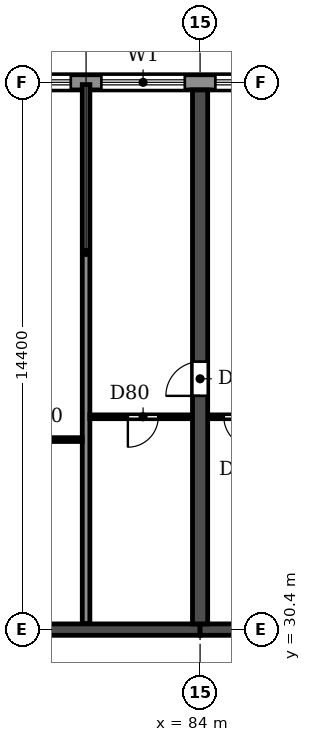
"""IFC4 building model, lengths in metres.
Left out: names, types, materials, properties, quantities, classifications, styles, units other than length and angle.
Written with IfcOpenShell. Run it as: python <this file> out.ifc"""

import sys

from ifc_helpers import new_model, si_unit, direction, frame, frame_2d, origin, place, context, subcontext, project, spatial, rectangle, extrude, element, fill, save


model = new_model("IFC4")
c1 = context("Model", 3, precision=1e-05, world=origin(), true_north=direction((0.0, 1.0)))
c2 = subcontext(c1, "Body", "Model", "MODEL_VIEW")
j1 = project(units=[si_unit("LENGTHUNIT", "METRE"), si_unit("PLANEANGLEUNIT", "RADIAN")], contexts=[c1])
p1 = place(None, origin())
s1 = spatial("IfcSite", under=j1, at=p1, CompositionType="ELEMENT")
p2 = place(p1, origin())
s2 = spatial("IfcBuilding", under=s1, at=p2, CompositionType="ELEMENT")
p3 = place(p2, frame((0.0, 0.0, 23.4)))
s3 = spatial("IfcBuildingStorey", under=s2, at=p3, CompositionType="ELEMENT", Elevation=23.4)
p4 = place(p3, frame((84.0, 30.55, 0.0), z_axis=(0.0, 0.0, 1.0), x_axis=(0.0, 1.0, 0.0)))
e1 = element("IfcWall", 1, at=p4, inside=s3, PredefinedType="SHEAR", context=c2, shape_type="SweptSolid", body=[
    extrude(rectangle(XDim=14.05, YDim=0.4, at=frame_2d((7.025, 0.0))), origin(), (0.0, 0.0, 1.0), 3.05),
])
p5 = place(p4, frame((6.0, 0.0, 0.0)))
e2 = element("IfcOpeningElement", 2, at=p5, cuts=e1, PredefinedType="OPENING", context=c2, shape_type="SweptSolid", body=[
    extrude(rectangle(XDim=0.9, YDim=2.1, at=frame_2d((0.45, 1.05))), frame((0.0, 0.21, 0.0), z_axis=(0.0, -1.0, 0.0), x_axis=(1.0, 0.0, 0.0)), (0.0, 0.0, 1.0), 0.42),
])
p6 = place(p3, frame((78.0, 30.4, 0.0), z_axis=(0.0, 0.0, 1.0), x_axis=(1.0, 0.0, 0.0)))
e3 = element("IfcWall", 3, at=p6, inside=s3, PredefinedType="SHEAR", context=c2, shape_type="SweptSolid", body=[
    extrude(rectangle(XDim=6.0, YDim=0.3, at=frame_2d((3.0, 0.0))), origin(), (0.0, 0.0, 1.0), 2.45),
])
p7 = place(p3, frame((84.0, 30.4, 0.0), z_axis=(0.0, 0.0, 1.0), x_axis=(1.0, 0.0, 0.0)))
e4 = element("IfcWall", 4, at=p7, inside=s3, PredefinedType="SHEAR", context=c2, shape_type="SweptSolid", body=[
    extrude(rectangle(XDim=6.0, YDim=0.3, at=frame_2d((3.0, 0.0))), origin(), (0.0, 0.0, 1.0), 2.45),
])
p8 = place(p7, frame((2.45, 0.0, 0.0)))
e5 = element("IfcOpeningElement", 5, at=p8, cuts=e4, PredefinedType="OPENING", context=c2, shape_type="SweptSolid", body=[
    extrude(rectangle(XDim=1.0, YDim=2.1, at=frame_2d((0.5, 1.05))), frame((0.0, 0.16, 0.0), z_axis=(0.0, -1.0, 0.0), x_axis=(1.0, 0.0, 0.0)), (0.0, 0.0, 1.0), 0.32),
])
p9 = place(p3, frame((97.317, 44.8, 0.0), z_axis=(0.0, 0.0, 1.0), x_axis=(-1.0, 0.0, 0.0)))
e6 = element("IfcWall", 6, at=p9, inside=s3, PredefinedType="STANDARD", context=c2, shape_type="SweptSolid", body=[
    extrude(rectangle(XDim=92.634, YDim=0.4, at=frame_2d((46.317, 0.0))), origin(), (0.0, 0.0, 1.0), 3.05),
])
p10 = place(p9, frame((88.717, 0.0, 0.9)))
e7 = element("IfcOpeningElement", 7, at=p10, cuts=e6, PredefinedType="OPENING", context=c2, shape_type="SweptSolid", body=[
    extrude(rectangle(XDim=2.2, YDim=1.5, at=frame_2d((1.1, 0.75))), frame((0.0, 0.21, 0.0), z_axis=(0.0, -1.0, 0.0), x_axis=(1.0, 0.0, 0.0)), (0.0, 0.0, 1.0), 0.42),
])
p11 = place(p9, frame((85.917, 0.0, 0.0)))
e8 = element("IfcOpeningElement", 8, at=p11, cuts=e6, PredefinedType="OPENING", context=c2, shape_type="SweptSolid", body=[
    extrude(rectangle(XDim=1.8, YDim=2.4, at=frame_2d((0.9, 1.2))), frame((0.0, 0.21, 0.0), z_axis=(0.0, -1.0, 0.0), x_axis=(1.0, 0.0, 0.0)), (0.0, 0.0, 1.0), 0.42),
])
p12 = place(p9, frame((82.717, 0.0, 0.9)))
e9 = element("IfcOpeningElement", 9, at=p12, cuts=e6, PredefinedType="OPENING", context=c2, shape_type="SweptSolid", body=[
    extrude(rectangle(XDim=2.2, YDim=1.5, at=frame_2d((1.1, 0.75))), frame((0.0, 0.21, 0.0), z_axis=(0.0, -1.0, 0.0), x_axis=(1.0, 0.0, 0.0)), (0.0, 0.0, 1.0), 0.42),
])
p13 = place(p9, frame((79.717, 0.0, 0.9)))
e10 = element("IfcOpeningElement", 10, at=p13, cuts=e6, PredefinedType="OPENING", context=c2, shape_type="SweptSolid", body=[
    extrude(rectangle(XDim=2.2, YDim=1.5, at=frame_2d((1.1, 0.75))), frame((0.0, 0.21, 0.0), z_axis=(0.0, -1.0, 0.0), x_axis=(1.0, 0.0, 0.0)), (0.0, 0.0, 1.0), 0.42),
])
p14 = place(p9, frame((76.917, 0.0, 0.0)))
e11 = element("IfcOpeningElement", 11, at=p14, cuts=e6, PredefinedType="OPENING", context=c2, shape_type="SweptSolid", body=[
    extrude(rectangle(XDim=1.8, YDim=2.4, at=frame_2d((0.9, 1.2))), frame((0.0, 0.21, 0.0), z_axis=(0.0, -1.0, 0.0), x_axis=(1.0, 0.0, 0.0)), (0.0, 0.0, 1.0), 0.42),
])
p15 = place(p9, frame((73.717, 0.0, 0.9)))
e12 = element("IfcOpeningElement", 12, at=p15, cuts=e6, PredefinedType="OPENING", context=c2, shape_type="SweptSolid", body=[
    extrude(rectangle(XDim=2.2, YDim=1.5, at=frame_2d((1.1, 0.75))), frame((0.0, 0.21, 0.0), z_axis=(0.0, -1.0, 0.0), x_axis=(1.0, 0.0, 0.0)), (0.0, 0.0, 1.0), 0.42),
])
p16 = place(p9, frame((70.717, 0.0, 0.9)))
e13 = element("IfcOpeningElement", 13, at=p16, cuts=e6, PredefinedType="OPENING", context=c2, shape_type="SweptSolid", body=[
    extrude(rectangle(XDim=2.2, YDim=1.5, at=frame_2d((1.1, 0.75))), frame((0.0, 0.21, 0.0), z_axis=(0.0, -1.0, 0.0), x_axis=(1.0, 0.0, 0.0)), (0.0, 0.0, 1.0), 0.42),
])
p17 = place(p9, frame((67.717, 0.0, 0.9)))
e14 = element("IfcOpeningElement", 14, at=p17, cuts=e6, PredefinedType="OPENING", context=c2, shape_type="SweptSolid", body=[
    extrude(rectangle(XDim=2.2, YDim=1.5, at=frame_2d((1.1, 0.75))), frame((0.0, 0.21, 0.0), z_axis=(0.0, -1.0, 0.0), x_axis=(1.0, 0.0, 0.0)), (0.0, 0.0, 1.0), 0.42),
])
p18 = place(p9, frame((64.917, 0.0, 0.0)))
e15 = element("IfcOpeningElement", 15, at=p18, cuts=e6, PredefinedType="OPENING", context=c2, shape_type="SweptSolid", body=[
    extrude(rectangle(XDim=1.8, YDim=2.4, at=frame_2d((0.9, 1.2))), frame((0.0, 0.21, 0.0), z_axis=(0.0, -1.0, 0.0), x_axis=(1.0, 0.0, 0.0)), (0.0, 0.0, 1.0), 0.42),
])
p19 = place(p9, frame((61.717, 0.0, 0.9)))
e16 = element("IfcOpeningElement", 16, at=p19, cuts=e6, PredefinedType="OPENING", context=c2, shape_type="SweptSolid", body=[
    extrude(rectangle(XDim=2.2, YDim=1.5, at=frame_2d((1.1, 0.75))), frame((0.0, 0.21, 0.0), z_axis=(0.0, -1.0, 0.0), x_axis=(1.0, 0.0, 0.0)), (0.0, 0.0, 1.0), 0.42),
])
p20 = place(p9, frame((58.717, 0.0, 0.9)))
e17 = element("IfcOpeningElement", 17, at=p20, cuts=e6, PredefinedType="OPENING", context=c2, shape_type="SweptSolid", body=[
    extrude(rectangle(XDim=2.2, YDim=1.5, at=frame_2d((1.1, 0.75))), frame((0.0, 0.21, 0.0), z_axis=(0.0, -1.0, 0.0), x_axis=(1.0, 0.0, 0.0)), (0.0, 0.0, 1.0), 0.42),
])
p21 = place(p9, frame((55.917, 0.0, 0.0)))
e18 = element("IfcOpeningElement", 18, at=p21, cuts=e6, PredefinedType="OPENING", context=c2, shape_type="SweptSolid", body=[
    extrude(rectangle(XDim=1.8, YDim=2.4, at=frame_2d((0.9, 1.2))), frame((0.0, 0.21, 0.0), z_axis=(0.0, -1.0, 0.0), x_axis=(1.0, 0.0, 0.0)), (0.0, 0.0, 1.0), 0.42),
])
p22 = place(p9, frame((52.917, 0.0, 0.0)))
e19 = element("IfcOpeningElement", 19, at=p22, cuts=e6, PredefinedType="OPENING", context=c2, shape_type="SweptSolid", body=[
    extrude(rectangle(XDim=1.8, YDim=2.4, at=frame_2d((0.9, 1.2))), frame((0.0, 0.21, 0.0), z_axis=(0.0, -1.0, 0.0), x_axis=(1.0, 0.0, 0.0)), (0.0, 0.0, 1.0), 0.42),
])
p23 = place(p9, frame((49.717, 0.0, 0.9)))
e20 = element("IfcOpeningElement", 20, at=p23, cuts=e6, PredefinedType="OPENING", context=c2, shape_type="SweptSolid", body=[
    extrude(rectangle(XDim=2.2, YDim=1.5, at=frame_2d((1.1, 0.75))), frame((0.0, 0.21, 0.0), z_axis=(0.0, -1.0, 0.0), x_axis=(1.0, 0.0, 0.0)), (0.0, 0.0, 1.0), 0.42),
])
p24 = place(p9, frame((46.917, 0.0, 0.0)))
e21 = element("IfcOpeningElement", 21, at=p24, cuts=e6, PredefinedType="OPENING", context=c2, shape_type="SweptSolid", body=[
    extrude(rectangle(XDim=1.8, YDim=2.4, at=frame_2d((0.9, 1.2))), frame((0.0, 0.21, 0.0), z_axis=(0.0, -1.0, 0.0), x_axis=(1.0, 0.0, 0.0)), (0.0, 0.0, 1.0), 0.42),
])
p25 = place(p9, frame((43.717, 0.0, 0.9)))
e22 = element("IfcOpeningElement", 22, at=p25, cuts=e6, PredefinedType="OPENING", context=c2, shape_type="SweptSolid", body=[
    extrude(rectangle(XDim=2.2, YDim=1.5, at=frame_2d((1.1, 0.75))), frame((0.0, 0.21, 0.0), z_axis=(0.0, -1.0, 0.0), x_axis=(1.0, 0.0, 0.0)), (0.0, 0.0, 1.0), 0.42),
])
p26 = place(p9, frame((40.717, 0.0, 0.9)))
e23 = element("IfcOpeningElement", 23, at=p26, cuts=e6, PredefinedType="OPENING", context=c2, shape_type="SweptSolid", body=[
    extrude(rectangle(XDim=2.2, YDim=1.5, at=frame_2d((1.1, 0.75))), frame((0.0, 0.21, 0.0), z_axis=(0.0, -1.0, 0.0), x_axis=(1.0, 0.0, 0.0)), (0.0, 0.0, 1.0), 0.42),
])
p27 = place(p9, frame((37.917, 0.0, 0.0)))
e24 = element("IfcOpeningElement", 24, at=p27, cuts=e6, PredefinedType="OPENING", context=c2, shape_type="SweptSolid", body=[
    extrude(rectangle(XDim=1.8, YDim=2.4, at=frame_2d((0.9, 1.2))), frame((0.0, 0.21, 0.0), z_axis=(0.0, -1.0, 0.0), x_axis=(1.0, 0.0, 0.0)), (0.0, 0.0, 1.0), 0.42),
])
p28 = place(p9, frame((34.917, 0.0, 0.0)))
e25 = element("IfcOpeningElement", 25, at=p28, cuts=e6, PredefinedType="OPENING", context=c2, shape_type="SweptSolid", body=[
    extrude(rectangle(XDim=1.8, YDim=2.4, at=frame_2d((0.9, 1.2))), frame((0.0, 0.21, 0.0), z_axis=(0.0, -1.0, 0.0), x_axis=(1.0, 0.0, 0.0)), (0.0, 0.0, 1.0), 0.42),
])
p29 = place(p9, frame((31.717, 0.0, 0.9)))
e26 = element("IfcOpeningElement", 26, at=p29, cuts=e6, PredefinedType="OPENING", context=c2, shape_type="SweptSolid", body=[
    extrude(rectangle(XDim=2.2, YDim=1.5, at=frame_2d((1.1, 0.75))), frame((0.0, 0.21, 0.0), z_axis=(0.0, -1.0, 0.0), x_axis=(1.0, 0.0, 0.0)), (0.0, 0.0, 1.0), 0.42),
])
p30 = place(p9, frame((28.717, 0.0, 0.9)))
e27 = element("IfcOpeningElement", 27, at=p30, cuts=e6, PredefinedType="OPENING", context=c2, shape_type="SweptSolid", body=[
    extrude(rectangle(XDim=2.2, YDim=1.5, at=frame_2d((1.1, 0.75))), frame((0.0, 0.21, 0.0), z_axis=(0.0, -1.0, 0.0), x_axis=(1.0, 0.0, 0.0)), (0.0, 0.0, 1.0), 0.42),
])
p31 = place(p9, frame((25.717, 0.0, 0.9)))
e28 = element("IfcOpeningElement", 28, at=p31, cuts=e6, PredefinedType="OPENING", context=c2, shape_type="SweptSolid", body=[
    extrude(rectangle(XDim=2.2, YDim=1.5, at=frame_2d((1.1, 0.75))), frame((0.0, 0.21, 0.0), z_axis=(0.0, -1.0, 0.0), x_axis=(1.0, 0.0, 0.0)), (0.0, 0.0, 1.0), 0.42),
])
p32 = place(p9, frame((22.717, 0.0, 0.9)))
e29 = element("IfcOpeningElement", 29, at=p32, cuts=e6, PredefinedType="OPENING", context=c2, shape_type="SweptSolid", body=[
    extrude(rectangle(XDim=2.2, YDim=1.5, at=frame_2d((1.1, 0.75))), frame((0.0, 0.21, 0.0), z_axis=(0.0, -1.0, 0.0), x_axis=(1.0, 0.0, 0.0)), (0.0, 0.0, 1.0), 0.42),
])
p33 = place(p9, frame((19.917, 0.0, 0.0)))
e30 = element("IfcOpeningElement", 30, at=p33, cuts=e6, PredefinedType="OPENING", context=c2, shape_type="SweptSolid", body=[
    extrude(rectangle(XDim=1.8, YDim=2.4, at=frame_2d((0.9, 1.2))), frame((0.0, 0.21, 0.0), z_axis=(0.0, -1.0, 0.0), x_axis=(1.0, 0.0, 0.0)), (0.0, 0.0, 1.0), 0.42),
])
p34 = place(p9, frame((16.717, 0.0, 0.9)))
e31 = element("IfcOpeningElement", 31, at=p34, cuts=e6, PredefinedType="OPENING", context=c2, shape_type="SweptSolid", body=[
    extrude(rectangle(XDim=2.2, YDim=1.5, at=frame_2d((1.1, 0.75))), frame((0.0, 0.21, 0.0), z_axis=(0.0, -1.0, 0.0), x_axis=(1.0, 0.0, 0.0)), (0.0, 0.0, 1.0), 0.42),
])
p35 = place(p9, frame((13.717, 0.0, 0.9)))
e32 = element("IfcOpeningElement", 32, at=p35, cuts=e6, PredefinedType="OPENING", context=c2, shape_type="SweptSolid", body=[
    extrude(rectangle(XDim=2.2, YDim=1.5, at=frame_2d((1.1, 0.75))), frame((0.0, 0.21, 0.0), z_axis=(0.0, -1.0, 0.0), x_axis=(1.0, 0.0, 0.0)), (0.0, 0.0, 1.0), 0.42),
])
p36 = place(p9, frame((10.717, 0.0, 0.9)))
e33 = element("IfcOpeningElement", 33, at=p36, cuts=e6, PredefinedType="OPENING", context=c2, shape_type="SweptSolid", body=[
    extrude(rectangle(XDim=2.2, YDim=1.5, at=frame_2d((1.1, 0.75))), frame((0.0, 0.21, 0.0), z_axis=(0.0, -1.0, 0.0), x_axis=(1.0, 0.0, 0.0)), (0.0, 0.0, 1.0), 0.42),
])
p37 = place(p9, frame((7.917, 0.0, 0.0)))
e34 = element("IfcOpeningElement", 34, at=p37, cuts=e6, PredefinedType="OPENING", context=c2, shape_type="SweptSolid", body=[
    extrude(rectangle(XDim=1.8, YDim=2.4, at=frame_2d((0.9, 1.2))), frame((0.0, 0.21, 0.0), z_axis=(0.0, -1.0, 0.0), x_axis=(1.0, 0.0, 0.0)), (0.0, 0.0, 1.0), 0.42),
])
p38 = place(p9, frame((4.917, 0.0, 0.0)))
e35 = element("IfcOpeningElement", 35, at=p38, cuts=e6, PredefinedType="OPENING", context=c2, shape_type="SweptSolid", body=[
    extrude(rectangle(XDim=1.8, YDim=2.4, at=frame_2d((0.9, 1.2))), frame((0.0, 0.21, 0.0), z_axis=(0.0, -1.0, 0.0), x_axis=(1.0, 0.0, 0.0)), (0.0, 0.0, 1.0), 0.42),
])
p39 = place(p9, frame((1.717, 0.0, 0.9)))
e36 = element("IfcOpeningElement", 36, at=p39, cuts=e6, PredefinedType="OPENING", context=c2, shape_type="SweptSolid", body=[
    extrude(rectangle(XDim=2.2, YDim=1.5, at=frame_2d((1.1, 0.75))), frame((0.0, 0.21, 0.0), z_axis=(0.0, -1.0, 0.0), x_axis=(1.0, 0.0, 0.0)), (0.0, 0.0, 1.0), 0.42),
])
p40 = place(p3, frame((81.0, 30.56, 0.0), z_axis=(0.0, 0.0, 1.0), x_axis=(0.0, 1.0, 0.0)))
e37 = element("IfcWall", 37, at=p40, inside=s3, PredefinedType="PARTITIONING", context=c2, shape_type="SweptSolid", body=[
    extrude(rectangle(XDim=14.18, YDim=0.2, at=frame_2d((7.09, 0.0))), origin(), (0.0, 0.0, 1.0), 3.05),
])
p41 = place(p3, frame((78.21, 35.4, 0.0), z_axis=(0.0, 0.0, 1.0), x_axis=(1.0, 0.0, 0.0)))
e38 = element("IfcWall", 38, at=p41, inside=s3, PredefinedType="PARTITIONING", context=c2, shape_type="SweptSolid", body=[
    extrude(rectangle(XDim=2.69, YDim=0.1, at=frame_2d((1.345, 0.0))), origin(), (0.0, 0.0, 1.0), 3.05),
])
p42 = place(p41, frame((0.89, 0.0, 0.0)))
e39 = element("IfcOpeningElement", 39, at=p42, cuts=e38, PredefinedType="OPENING", context=c2, shape_type="SweptSolid", body=[
    extrude(rectangle(XDim=0.8, YDim=2.1, at=frame_2d((0.4, 1.05))), frame((0.0, 0.06, 0.0), z_axis=(0.0, -1.0, 0.0), x_axis=(1.0, 0.0, 0.0)), (0.0, 0.0, 1.0), 0.12),
])
p43 = place(p3, frame((81.1, 36.0, 0.0), z_axis=(0.0, 0.0, 1.0), x_axis=(1.0, 0.0, 0.0)))
e40 = element("IfcWall", 40, at=p43, inside=s3, PredefinedType="PARTITIONING", context=c2, shape_type="SweptSolid", body=[
    extrude(rectangle(XDim=2.69, YDim=0.1, at=frame_2d((1.345, 0.0))), origin(), (0.0, 0.0, 1.0), 3.05),
])
p44 = place(p43, frame((1.0, 0.0, 0.0)))
e41 = element("IfcOpeningElement", 41, at=p44, cuts=e40, PredefinedType="OPENING", context=c2, shape_type="SweptSolid", body=[
    extrude(rectangle(XDim=0.8, YDim=2.1, at=frame_2d((0.4, 1.05))), frame((0.0, 0.06, 0.0), z_axis=(0.0, -1.0, 0.0), x_axis=(1.0, 0.0, 0.0)), (0.0, 0.0, 1.0), 0.12),
])
p45 = place(p3, frame((84.21, 36.0, 0.0), z_axis=(0.0, 0.0, 1.0), x_axis=(1.0, 0.0, 0.0)))
e42 = element("IfcWall", 42, at=p45, inside=s3, PredefinedType="PARTITIONING", context=c2, shape_type="SweptSolid", body=[
    extrude(rectangle(XDim=1.89, YDim=0.1, at=frame_2d((0.945, 0.0))), origin(), (0.0, 0.0, 1.0), 3.05),
])
p46 = place(p45, frame((0.415, 0.0, 0.0)))
e43 = element("IfcOpeningElement", 43, at=p46, cuts=e42, PredefinedType="OPENING", context=c2, shape_type="SweptSolid", body=[
    extrude(rectangle(XDim=0.8, YDim=2.1, at=frame_2d((0.4, 1.05))), frame((0.0, 0.06, 0.0), z_axis=(0.0, -1.0, 0.0), x_axis=(1.0, 0.0, 0.0)), (0.0, 0.0, 1.0), 0.12),
])
p47 = place(p34, origin())
e44 = element("IfcWindow", 44, at=p47, inside=s3, PartitioningType="DOUBLE_PANEL_HORIZONTAL", PredefinedType="WINDOW", context=c2, shape_type="SweptSolid", body=[
    extrude(rectangle(XDim=2.2, YDim=1.5, at=frame_2d((1.1, 0.75))), frame((0.0, 0.03, 0.0), z_axis=(0.0, -1.0, 0.0), x_axis=(1.0, 0.0, 0.0)), (0.0, 0.0, 1.0), 0.06),
])
fill(e31, e44)
p48 = place(p35, origin())
e45 = element("IfcWindow", 45, at=p48, inside=s3, PartitioningType="DOUBLE_PANEL_HORIZONTAL", PredefinedType="WINDOW", context=c2, shape_type="SweptSolid", body=[
    extrude(rectangle(XDim=2.2, YDim=1.5, at=frame_2d((1.1, 0.75))), frame((0.0, 0.03, 0.0), z_axis=(0.0, -1.0, 0.0), x_axis=(1.0, 0.0, 0.0)), (0.0, 0.0, 1.0), 0.06),
])
fill(e32, e45)
p49 = place(p36, origin())
e46 = element("IfcWindow", 46, at=p49, inside=s3, PartitioningType="DOUBLE_PANEL_HORIZONTAL", PredefinedType="WINDOW", context=c2, shape_type="SweptSolid", body=[
    extrude(rectangle(XDim=2.2, YDim=1.5, at=frame_2d((1.1, 0.75))), frame((0.0, 0.03, 0.0), z_axis=(0.0, -1.0, 0.0), x_axis=(1.0, 0.0, 0.0)), (0.0, 0.0, 1.0), 0.06),
])
fill(e33, e46)
p50 = place(p44, frame((0.8, 0.0, 0.0), z_axis=(0.0, 0.0, 1.0), x_axis=(-1.0, 0.0, 0.0)))
e47 = element("IfcDoor", 47, at=p50, inside=s3, OperationType="SINGLE_SWING_RIGHT", PredefinedType="DOOR", context=c2, shape_type="SweptSolid", body=[
    extrude(rectangle(XDim=0.8, YDim=2.1, at=frame_2d((0.4, 1.05))), frame((0.0, 0.025, 0.0), z_axis=(0.0, -1.0, 0.0), x_axis=(1.0, 0.0, 0.0)), (0.0, 0.0, 1.0), 0.05),
])
fill(e41, e47)
p51 = place(p5, origin())
e48 = element("IfcDoor", 48, at=p51, inside=s3, OperationType="SINGLE_SWING_LEFT", PredefinedType="DOOR", context=c2, shape_type="SweptSolid", body=[
    extrude(rectangle(XDim=0.9, YDim=2.1, at=frame_2d((0.45, 1.05))), frame((0.0, 0.025, 0.0), z_axis=(0.0, -1.0, 0.0), x_axis=(1.0, 0.0, 0.0)), (0.0, 0.0, 1.0), 0.05),
])
fill(e2, e48)
p52 = place(p46, frame((0.8, 0.0, 0.0), z_axis=(0.0, 0.0, 1.0), x_axis=(-1.0, 0.0, 0.0)))
e49 = element("IfcDoor", 49, at=p52, inside=s3, OperationType="SINGLE_SWING_LEFT", PredefinedType="DOOR", context=c2, shape_type="SweptSolid", body=[
    extrude(rectangle(XDim=0.8, YDim=2.1, at=frame_2d((0.4, 1.05))), frame((0.0, 0.025, 0.0), z_axis=(0.0, -1.0, 0.0), x_axis=(1.0, 0.0, 0.0)), (0.0, 0.0, 1.0), 0.05),
])
fill(e43, e49)
save(model, sys.argv[1])
